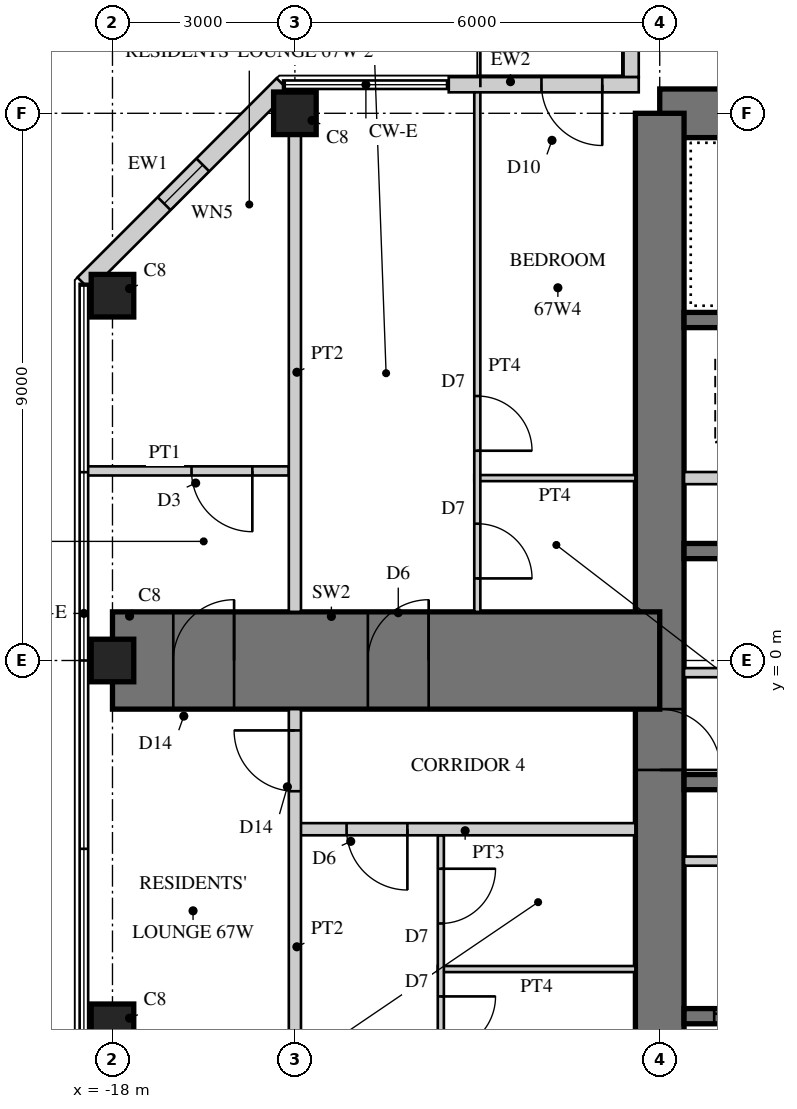
"""IFC4 building model, lengths in metres.
Left out: names, types, materials, properties, quantities, classifications, styles, units other than length and angle.
Written with IfcOpenShell. Run it as: python <this file> out.ifc"""

import sys

from ifc_helpers import new_model, si_unit, direction, frame, frame_2d, origin, origin_2d, place, context, subcontext, project, spatial, rectangle, hollow_rectangle, extrude, element, fill, save


model = new_model("IFC4")
c1 = context("Model", 3, precision=1e-05, world=origin(), true_north=direction((0.0, 1.0)))
c2 = subcontext(c1, "Body", "Model", "MODEL_VIEW")
j1 = project(units=[si_unit("LENGTHUNIT", "METRE"), si_unit("PLANEANGLEUNIT", "RADIAN")], contexts=[c1])
p1 = place(None, origin())
s1 = spatial("IfcSite", under=j1, at=p1, CompositionType="ELEMENT")
p2 = place(p1, origin())
s2 = spatial("IfcBuilding", under=s1, at=p2, CompositionType="ELEMENT")
p3 = place(p2, frame((0.0, 0.0, 261.1)))
s3 = spatial("IfcBuildingStorey", under=s2, at=p3, CompositionType="ELEMENT", Elevation=261.1)
p4 = place(p3, frame((9.0, 9.0, 0.0), z_axis=(0.0, 0.0, 1.0), x_axis=(-1.0, 0.0, 0.0)))
e1 = element("IfcWall", 1, at=p4, inside=s3, PredefinedType="SHEAR", context=c2, shape_type="SweptSolid", body=[
    extrude(rectangle(XDim=18.0, YDim=0.8, at=frame_2d((9.0, 0.0))), origin(), (0.0, 0.0, 1.0), 3.4),
])
p5 = place(p4, frame((9.8, 0.0, 0.0)))
e2 = element("IfcOpeningElement", 2, at=p5, cuts=e1, PredefinedType="OPENING", context=c2, shape_type="SweptSolid", body=[
    extrude(rectangle(XDim=1.0, YDim=2.4, at=frame_2d((0.5, 1.2))), frame((0.0, 0.41, 0.0), z_axis=(0.0, -1.0, 0.0), x_axis=(1.0, 0.0, 0.0)), (0.0, 0.0, 1.0), 0.82),
])
p6 = place(p3, frame((-9.0, 9.0, 0.0), z_axis=(0.0, 0.0, 1.0), x_axis=(0.0, -1.0, 0.0)))
e3 = element("IfcWall", 3, at=p6, inside=s3, PredefinedType="SHEAR", context=c2, shape_type="SweptSolid", body=[
    extrude(rectangle(XDim=18.0, YDim=0.8, at=frame_2d((9.0, 0.0))), origin(), (0.0, 0.0, 1.0), 3.4),
])
p7 = place(p6, frame((9.8, 0.0, 0.0)))
e4 = element("IfcOpeningElement", 4, at=p7, cuts=e3, PredefinedType="OPENING", context=c2, shape_type="SweptSolid", body=[
    extrude(rectangle(XDim=1.0, YDim=2.4, at=frame_2d((0.5, 1.2))), frame((0.0, 0.41, 0.0), z_axis=(0.0, -1.0, 0.0), x_axis=(1.0, 0.0, 0.0)), (0.0, 0.0, 1.0), 0.82),
])
p8 = place(p3, frame((-2.125, 1.8, 0.0), z_axis=(0.0, 0.0, 1.0), x_axis=(-1.0, 0.0, 0.0)))
e5 = element("IfcWall", 5, at=p8, inside=s3, PredefinedType="SHEAR", context=c2, shape_type="SweptSolid", body=[
    extrude(rectangle(XDim=6.475, YDim=0.25, at=frame_2d((3.238, 0.0))), origin(), (0.0, 0.0, 1.0), 3.4),
])
p9 = place(p3, frame((-2.125, 5.6, 0.0), z_axis=(0.0, 0.0, 1.0), x_axis=(-1.0, 0.0, 0.0)))
e6 = element("IfcWall", 6, at=p9, inside=s3, PredefinedType="SHEAR", context=c2, shape_type="SweptSolid", body=[
    extrude(rectangle(XDim=6.475, YDim=0.25, at=frame_2d((3.238, 0.0))), origin(), (0.0, 0.0, 1.0), 3.4),
])
p10 = place(p9, frame((0.175, 0.0, 0.0)))
e7 = element("IfcOpeningElement", 7, at=p10, cuts=e6, PredefinedType="OPENING", context=c2, shape_type="SweptSolid", body=[
    extrude(rectangle(XDim=1.0, YDim=2.1, at=frame_2d((0.5, 1.05))), frame((0.0, 0.135, 0.0), z_axis=(0.0, -1.0, 0.0), x_axis=(1.0, 0.0, 0.0)), (0.0, 0.0, 1.0), 0.27),
])
p11 = place(p3, frame((-5.725, 3.0, 0.0), z_axis=(0.0, 0.0, 1.0), x_axis=(-1.0, 0.0, 0.0)))
e8 = element("IfcWall", 8, at=p11, inside=s3, PredefinedType="PARTITIONING", context=c2, shape_type="SweptSolid", body=[
    extrude(rectangle(XDim=2.875, YDim=0.2, at=frame_2d((1.438, 0.0))), origin(), (0.0, 0.0, 1.0), 3.4),
])
p12 = place(p3, frame((-1.925, -2.0, 0.0), z_axis=(0.0, 0.0, 1.0), x_axis=(-1.0, 0.0, 0.0)))
e9 = element("IfcWall", 9, at=p12, inside=s3, PredefinedType="SHEAR", context=c2, shape_type="SweptSolid", body=[
    extrude(rectangle(XDim=6.675, YDim=0.25, at=frame_2d((3.337, 0.0))), origin(), (0.0, 0.0, 1.0), 3.4),
])
p13 = place(p3, frame((-1.925, -5.85, 0.0), z_axis=(0.0, 0.0, 1.0), x_axis=(-1.0, 0.0, 0.0)))
e10 = element("IfcWall", 10, at=p13, inside=s3, PredefinedType="SHEAR", context=c2, shape_type="SweptSolid", body=[
    extrude(rectangle(XDim=6.675, YDim=0.25, at=frame_2d((3.337, 0.0))), origin(), (0.0, 0.0, 1.0), 3.4),
])
p14 = place(p13, frame((0.496, 0.0, 0.0)))
e11 = element("IfcOpeningElement", 11, at=p14, cuts=e10, PredefinedType="OPENING", context=c2, shape_type="SweptSolid", body=[
    extrude(rectangle(XDim=1.1, YDim=2.2, at=frame_2d((0.55, 1.1))), frame((0.0, 0.135, 0.0), z_axis=(0.0, -1.0, 0.0), x_axis=(1.0, 0.0, 0.0)), (0.0, 0.0, 1.0), 0.27),
])
p15 = place(p13, frame((2.788, 0.0, 0.0)))
e12 = element("IfcOpeningElement", 12, at=p15, cuts=e10, PredefinedType="OPENING", context=c2, shape_type="SweptSolid", body=[
    extrude(rectangle(XDim=1.1, YDim=2.2, at=frame_2d((0.55, 1.1))), frame((0.0, 0.135, 0.0), z_axis=(0.0, -1.0, 0.0), x_axis=(1.0, 0.0, 0.0)), (0.0, 0.0, 1.0), 0.27),
])
p16 = place(p13, frame((5.079, 0.0, 0.0)))
e13 = element("IfcOpeningElement", 13, at=p16, cuts=e10, PredefinedType="OPENING", context=c2, shape_type="SweptSolid", body=[
    extrude(rectangle(XDim=1.1, YDim=2.2, at=frame_2d((0.55, 1.1))), frame((0.0, 0.135, 0.0), z_axis=(0.0, -1.0, 0.0), x_axis=(1.0, 0.0, 0.0)), (0.0, 0.0, 1.0), 0.27),
])
p17 = place(p3, frame((-1.925, -3.3, 0.0), z_axis=(0.0, 0.0, 1.0), x_axis=(-1.0, 0.0, 0.0)))
e14 = element("IfcWall", 14, at=p17, inside=s3, PredefinedType="PARTITIONING", context=c2, shape_type="SweptSolid", body=[
    extrude(rectangle(XDim=6.675, YDim=0.15, at=frame_2d((3.337, 0.0))), origin(), (0.0, 0.0, 1.0), 3.4),
])
p18 = place(p17, frame((0.075, 0.0, 0.0)))
e15 = element("IfcOpeningElement", 15, at=p18, cuts=e14, PredefinedType="OPENING", context=c2, shape_type="SweptSolid", body=[
    extrude(rectangle(XDim=0.8, YDim=2.1, at=frame_2d((0.4, 1.05))), frame((0.0, 0.085, 0.0), z_axis=(0.0, -1.0, 0.0), x_axis=(1.0, 0.0, 0.0)), (0.0, 0.0, 1.0), 0.17),
])
p19 = place(p17, frame((3.675, 0.0, 0.0)))
e16 = element("IfcOpeningElement", 16, at=p19, cuts=e14, PredefinedType="OPENING", context=c2, shape_type="SweptSolid", body=[
    extrude(rectangle(XDim=0.8, YDim=2.1, at=frame_2d((0.4, 1.05))), frame((0.0, 0.085, 0.0), z_axis=(0.0, -1.0, 0.0), x_axis=(1.0, 0.0, 0.0)), (0.0, 0.0, 1.0), 0.17),
])
p20 = place(p3, frame((-9.0, 0.0, 0.0), z_axis=(0.0, 0.0, 1.0), x_axis=(-1.0, 0.0, 0.0)))
e17 = element("IfcWall", 17, at=p20, inside=s3, PredefinedType="SHEAR", context=c2, shape_type="SweptSolid", body=[
    extrude(rectangle(XDim=9.0, YDim=1.6, at=frame_2d((4.5, 0.0))), origin(), (0.0, 0.0, 1.0), 3.4),
])
p21 = place(p20, frame((3.8, 0.0, 0.0)))
e18 = element("IfcOpeningElement", 18, at=p21, cuts=e17, PredefinedType="OPENING", context=c2, shape_type="SweptSolid", body=[
    extrude(rectangle(XDim=1.0, YDim=2.15, at=frame_2d((0.5, 1.075))), frame((0.0, 0.81, 0.0), z_axis=(0.0, -1.0, 0.0), x_axis=(1.0, 0.0, 0.0)), (0.0, 0.0, 1.0), 1.62),
])
p22 = place(p20, frame((7.0, 0.0, 0.0)))
e19 = element("IfcOpeningElement", 19, at=p22, cuts=e17, PredefinedType="OPENING", context=c2, shape_type="SweptSolid", body=[
    extrude(rectangle(XDim=1.0, YDim=2.2, at=frame_2d((0.5, 1.1))), frame((0.0, 0.81, 0.0), z_axis=(0.0, -1.0, 0.0), x_axis=(1.0, 0.0, 0.0)), (0.0, 0.0, 1.0), 1.62),
])
for number, where, z_axis, x_axis in (
    (20, (-15.0, 9.0, 0.0), (0.0, 0.0, 1.0), (1.0, 0.0, 0.0)),
    (21, (-18.0, 6.0, 0.0), (0.0, 0.0, 1.0), (1.0, 0.0, 0.0)),
    (22, (-18.0, 0.0, 0.0), (0.0, 0.0, 1.0), (1.0, 0.0, 0.0)),
    (23, (-18.0, -6.0, 0.0), (0.0, 0.0, 1.0), (1.0, 0.0, 0.0)),
):
    element("IfcColumn", number, at=place(p3, frame(where, z_axis=z_axis, x_axis=x_axis)), inside=s3, PredefinedType="COLUMN", context=c2, shape_type="SweptSolid", body=[
        extrude(rectangle(XDim=0.7, YDim=0.7, at=origin_2d()), origin(), (0.0, 0.0, 1.0), 3.4),
    ])
p23 = place(p3, frame((-9.47, 12.47, 0.0), z_axis=(0.0, 0.0, 1.0), x_axis=(0.0, -1.0, 0.0)))
e24 = element("IfcWall", 24, at=p23, inside=s3, PredefinedType="SOLIDWALL", context=c2, shape_type="SweptSolid", body=[
    extrude(rectangle(XDim=2.875, YDim=0.25, at=frame_2d((1.438, 0.0))), origin(), (0.0, 0.0, 1.0), 3.22),
])
p24 = place(p23, frame((0.6, 0.0, 0.0)))
e25 = element("IfcOpeningElement", 25, at=p24, cuts=e24, PredefinedType="OPENING", context=c2, shape_type="SweptSolid", body=[
    extrude(rectangle(XDim=1.0, YDim=2.2, at=frame_2d((0.5, 1.1))), frame((0.0, 0.135, 0.0), z_axis=(0.0, -1.0, 0.0), x_axis=(1.0, 0.0, 0.0)), (0.0, 0.0, 1.0), 0.27),
])
p25 = place(p3, frame((-9.345, 9.47, 0.0), z_axis=(0.0, 0.0, 1.0), x_axis=(-1.0, 0.0, 0.0)))
e26 = element("IfcWall", 26, at=p25, inside=s3, PredefinedType="SOLIDWALL", context=c2, shape_type="SweptSolid", body=[
    extrude(rectangle(XDim=3.125, YDim=0.25, at=frame_2d((1.562, 0.0))), origin(), (0.0, 0.0, 1.0), 3.22),
])
p26 = place(p25, frame((0.6, 0.0, 0.0)))
e27 = element("IfcOpeningElement", 27, at=p26, cuts=e26, PredefinedType="OPENING", context=c2, shape_type="SweptSolid", body=[
    extrude(rectangle(XDim=1.0, YDim=2.2, at=frame_2d((0.5, 1.1))), frame((0.0, 0.135, 0.0), z_axis=(0.0, -1.0, 0.0), x_axis=(1.0, 0.0, 0.0)), (0.0, 0.0, 1.0), 0.27),
])
p27 = place(p3, frame((-15.195, 9.47, 0.0), z_axis=(0.0, 0.0, 1.0), x_axis=(-0.707106781187, -0.707106781187, 0.0)))
e28 = element("IfcWall", 28, at=p27, inside=s3, PredefinedType="SOLIDWALL", context=c2, shape_type="SweptSolid", body=[
    extrude(rectangle(XDim=4.632, YDim=0.3, at=frame_2d((2.316, 0.0))), origin(), (0.0, 0.0, 1.0), 3.22),
])
p28 = place(p27, frame((1.866, 0.0, 0.3)))
e29 = element("IfcOpeningElement", 29, at=p28, cuts=e28, PredefinedType="OPENING", context=c2, shape_type="SweptSolid", body=[
    extrude(rectangle(XDim=0.9, YDim=2.4, at=frame_2d((0.45, 1.2))), frame((0.0, 0.16, 0.0), z_axis=(0.0, -1.0, 0.0), x_axis=(1.0, 0.0, 0.0)), (0.0, 0.0, 1.0), 0.32),
])
p29 = place(p3, frame((-2.325, -0.2, 0.0), z_axis=(0.0, 0.0, 1.0), x_axis=(-1.0, 0.0, 0.0)))
e30 = element("IfcWall", 30, at=p29, inside=s3, PredefinedType="PARTITIONING", context=c2, shape_type="SweptSolid", body=[
    extrude(rectangle(XDim=6.275, YDim=0.15, at=frame_2d((3.138, 0.0))), origin(), (0.0, 0.0, 1.0), 3.22),
])
p30 = place(p29, frame((0.4, 0.0, 0.0)))
e31 = element("IfcOpeningElement", 31, at=p30, cuts=e30, PredefinedType="OPENING", context=c2, shape_type="SweptSolid", body=[
    extrude(rectangle(XDim=1.0, YDim=2.1, at=frame_2d((0.5, 1.05))), frame((0.0, 0.085, 0.0), z_axis=(0.0, -1.0, 0.0), x_axis=(1.0, 0.0, 0.0)), (0.0, 0.0, 1.0), 0.17),
])
p31 = place(p3, frame((-9.4, -5.075, 0.0), z_axis=(0.0, 0.0, 1.0), x_axis=(-1.0, 0.0, 0.0)))
e32 = element("IfcWall", 32, at=p31, inside=s3, PredefinedType="PARTITIONING", context=c2, shape_type="SweptSolid", body=[
    extrude(rectangle(XDim=3.25, YDim=0.1, at=frame_2d((1.625, 0.0))), origin(), (0.0, 0.0, 1.0), 3.22),
])
p32 = place(p3, frame((-12.6, -2.875, 0.0), z_axis=(0.0, 0.0, 1.0), x_axis=(0.0, -1.0, 0.0)))
e33 = element("IfcWall", 33, at=p32, inside=s3, PredefinedType="PARTITIONING", context=c2, shape_type="SweptSolid", body=[
    extrude(rectangle(XDim=6.555, YDim=0.1, at=frame_2d((3.277, 0.0))), origin(), (0.0, 0.0, 1.0), 3.22),
])
p33 = place(p32, frame((0.55, 0.0, 0.0)))
e34 = element("IfcOpeningElement", 34, at=p33, cuts=e33, PredefinedType="OPENING", context=c2, shape_type="SweptSolid", body=[
    extrude(rectangle(XDim=0.9, YDim=2.1, at=frame_2d((0.45, 1.05))), frame((0.0, 0.06, 0.0), z_axis=(0.0, -1.0, 0.0), x_axis=(1.0, 0.0, 0.0)), (0.0, 0.0, 1.0), 0.12),
])
p34 = place(p32, frame((2.65, 0.0, 0.0)))
e35 = element("IfcOpeningElement", 35, at=p34, cuts=e33, PredefinedType="OPENING", context=c2, shape_type="SweptSolid", body=[
    extrude(rectangle(XDim=0.9, YDim=2.1, at=frame_2d((0.45, 1.05))), frame((0.0, 0.06, 0.0), z_axis=(0.0, -1.0, 0.0), x_axis=(1.0, 0.0, 0.0)), (0.0, 0.0, 1.0), 0.12),
])
p35 = place(p3, frame((-9.4, 3.0, 0.0), z_axis=(0.0, 0.0, 1.0), x_axis=(-1.0, 0.0, 0.0)))
e36 = element("IfcWall", 36, at=p35, inside=s3, PredefinedType="PARTITIONING", context=c2, shape_type="SweptSolid", body=[
    extrude(rectangle(XDim=2.65, YDim=0.1, at=frame_2d((1.325, 0.0))), origin(), (0.0, 0.0, 1.0), 3.22),
])
p36 = place(p3, frame((-12.0, 9.345, 0.0), z_axis=(0.0, 0.0, 1.0), x_axis=(0.0, -1.0, 0.0)))
e37 = element("IfcWall", 37, at=p36, inside=s3, PredefinedType="PARTITIONING", context=c2, shape_type="SweptSolid", body=[
    extrude(rectangle(XDim=8.545, YDim=0.1, at=frame_2d((4.272, 0.0))), origin(), (0.0, 0.0, 1.0), 3.22),
])
p37 = place(p36, frame((4.995, 0.0, 0.0)))
e38 = element("IfcOpeningElement", 38, at=p37, cuts=e37, PredefinedType="OPENING", context=c2, shape_type="SweptSolid", body=[
    extrude(rectangle(XDim=0.9, YDim=2.1, at=frame_2d((0.45, 1.05))), frame((0.0, 0.06, 0.0), z_axis=(0.0, -1.0, 0.0), x_axis=(1.0, 0.0, 0.0)), (0.0, 0.0, 1.0), 0.12),
])
p38 = place(p36, frame((7.095, 0.0, 0.0)))
e39 = element("IfcOpeningElement", 39, at=p38, cuts=e37, PredefinedType="OPENING", context=c2, shape_type="SweptSolid", body=[
    extrude(rectangle(XDim=0.9, YDim=2.1, at=frame_2d((0.45, 1.05))), frame((0.0, 0.06, 0.0), z_axis=(0.0, -1.0, 0.0), x_axis=(1.0, 0.0, 0.0)), (0.0, 0.0, 1.0), 0.12),
])
p39 = place(p3, frame((-9.4, -2.775, 0.0), z_axis=(0.0, 0.0, 1.0), x_axis=(-1.0, 0.0, 0.0)))
e40 = element("IfcWall", 40, at=p39, inside=s3, PredefinedType="SOLIDWALL", context=c2, shape_type="SweptSolid", body=[
    extrude(rectangle(XDim=5.6, YDim=0.2, at=frame_2d((2.8, 0.0))), origin(), (0.0, 0.0, 1.0), 3.22),
])
p40 = place(p39, frame((3.75, 0.0, 0.0)))
e41 = element("IfcOpeningElement", 41, at=p40, cuts=e40, PredefinedType="OPENING", context=c2, shape_type="SweptSolid", body=[
    extrude(rectangle(XDim=1.0, YDim=2.15, at=frame_2d((0.5, 1.075))), frame((0.0, 0.11, 0.0), z_axis=(0.0, -1.0, 0.0), x_axis=(1.0, 0.0, 0.0)), (0.0, 0.0, 1.0), 0.22),
])
p41 = place(p3, frame((-15.1, 3.118, 0.0), z_axis=(0.0, 0.0, 1.0), x_axis=(-1.0, 0.0, 0.0)))
e42 = element("IfcWall", 42, at=p41, inside=s3, PredefinedType="PARTITIONING", context=c2, shape_type="SweptSolid", body=[
    extrude(rectangle(XDim=3.33, YDim=0.15, at=frame_2d((1.665, 0.0))), origin(), (0.0, 0.0, 1.0), 3.22),
])
p42 = place(p41, frame((0.6, 0.0, 0.0)))
e43 = element("IfcOpeningElement", 43, at=p42, cuts=e42, PredefinedType="OPENING", context=c2, shape_type="SweptSolid", body=[
    extrude(rectangle(XDim=1.0, YDim=2.1, at=frame_2d((0.5, 1.05))), frame((0.0, 0.085, 0.0), z_axis=(0.0, -1.0, 0.0), x_axis=(1.0, 0.0, 0.0)), (0.0, 0.0, 1.0), 0.17),
])
p43 = place(p3, frame((-15.0, 8.65, 0.0), z_axis=(0.0, 0.0, 1.0), x_axis=(0.0, -1.0, 0.0)))
e44 = element("IfcWall", 44, at=p43, inside=s3, PredefinedType="SOLIDWALL", context=c2, shape_type="SweptSolid", body=[
    extrude(rectangle(XDim=7.85, YDim=0.2, at=frame_2d((3.925, 0.0))), origin(), (0.0, 0.0, 1.0), 2.52),
])
p44 = place(p3, frame((-15.0, -0.8, 0.0), z_axis=(0.0, 0.0, 1.0), x_axis=(0.0, -1.0, 0.0)))
e45 = element("IfcWall", 45, at=p44, inside=s3, PredefinedType="SOLIDWALL", context=c2, shape_type="SweptSolid", body=[
    extrude(rectangle(XDim=7.85, YDim=0.2, at=frame_2d((3.925, 0.0))), origin(), (0.0, 0.0, 1.0), 2.52),
])
p45 = place(p44, frame((0.35, 0.0, 0.0)))
e46 = element("IfcOpeningElement", 46, at=p45, cuts=e45, PredefinedType="OPENING", context=c2, shape_type="SweptSolid", body=[
    extrude(rectangle(XDim=1.0, YDim=2.2, at=frame_2d((0.5, 1.1))), frame((0.0, 0.11, 0.0), z_axis=(0.0, -1.0, 0.0), x_axis=(1.0, 0.0, 0.0)), (0.0, 0.0, 1.0), 0.22),
])
p46 = place(p26, origin())
e47 = element("IfcDoor", 47, at=p46, inside=s3, OperationType="SINGLE_SWING_LEFT", PredefinedType="DOOR", context=c2, shape_type="SweptSolid", body=[
    extrude(hollow_rectangle(XDim=1.0, YDim=2.2, WallThickness=0.06, at=frame_2d((0.5, 1.1))), frame((0.0, 0.025, 0.0), z_axis=(0.0, -1.0, 0.0), x_axis=(1.0, 0.0, 0.0)), (0.0, 0.0, 1.0), 0.05),
    extrude(rectangle(XDim=0.879, YDim=2.079, at=frame_2d((0.5, 1.1))), frame((0.0, 0.025, 0.0), z_axis=(0.0, -1.0, 0.0), x_axis=(1.0, 0.0, 0.0)), (0.0, 0.0, 1.0), 0.05),
])
fill(e27, e47)
p47 = place(p28, origin())
e48 = element("IfcWindow", 48, at=p47, inside=s3, PartitioningType="SINGLE_PANEL", PredefinedType="WINDOW", context=c2, shape_type="SweptSolid", body=[
    extrude(hollow_rectangle(XDim=0.9, YDim=2.4, WallThickness=0.06, at=frame_2d((0.45, 1.2))), frame((0.0, 0.03, 0.0), z_axis=(0.0, -1.0, 0.0), x_axis=(1.0, 0.0, 0.0)), (0.0, 0.0, 1.0), 0.06),
    extrude(rectangle(XDim=0.779, YDim=2.279, at=frame_2d((0.45, 1.2))), frame((0.0, 0.03, 0.0), z_axis=(0.0, -1.0, 0.0), x_axis=(1.0, 0.0, 0.0)), (0.0, 0.0, 1.0), 0.06),
])
fill(e29, e48)
p48 = place(p33, origin())
e49 = element("IfcDoor", 49, at=p48, inside=s3, OperationType="SINGLE_SWING_LEFT", PredefinedType="DOOR", context=c2, shape_type="SweptSolid", body=[
    extrude(rectangle(XDim=0.9, YDim=2.1, at=frame_2d((0.45, 1.05))), frame((0.0, 0.025, 0.0), z_axis=(0.0, -1.0, 0.0), x_axis=(1.0, 0.0, 0.0)), (0.0, 0.0, 1.0), 0.05),
])
fill(e34, e49)
p49 = place(p34, origin())
e50 = element("IfcDoor", 50, at=p49, inside=s3, OperationType="SINGLE_SWING_LEFT", PredefinedType="DOOR", context=c2, shape_type="SweptSolid", body=[
    extrude(rectangle(XDim=0.9, YDim=2.1, at=frame_2d((0.45, 1.05))), frame((0.0, 0.025, 0.0), z_axis=(0.0, -1.0, 0.0), x_axis=(1.0, 0.0, 0.0)), (0.0, 0.0, 1.0), 0.05),
])
fill(e35, e50)
p50 = place(p37, origin())
e51 = element("IfcDoor", 51, at=p50, inside=s3, OperationType="SINGLE_SWING_RIGHT", PredefinedType="DOOR", context=c2, shape_type="SweptSolid", body=[
    extrude(rectangle(XDim=0.9, YDim=2.1, at=frame_2d((0.45, 1.05))), frame((0.0, 0.025, 0.0), z_axis=(0.0, -1.0, 0.0), x_axis=(1.0, 0.0, 0.0)), (0.0, 0.0, 1.0), 0.05),
])
fill(e38, e51)
p51 = place(p38, origin())
e52 = element("IfcDoor", 52, at=p51, inside=s3, OperationType="SINGLE_SWING_RIGHT", PredefinedType="DOOR", context=c2, shape_type="SweptSolid", body=[
    extrude(rectangle(XDim=0.9, YDim=2.1, at=frame_2d((0.45, 1.05))), frame((0.0, 0.025, 0.0), z_axis=(0.0, -1.0, 0.0), x_axis=(1.0, 0.0, 0.0)), (0.0, 0.0, 1.0), 0.05),
])
fill(e39, e52)
p52 = place(p40, origin())
e53 = element("IfcDoor", 53, at=p52, inside=s3, OperationType="SINGLE_SWING_LEFT", PredefinedType="DOOR", context=c2, shape_type="SweptSolid", body=[
    extrude(rectangle(XDim=1.0, YDim=2.15, at=frame_2d((0.5, 1.075))), frame((0.0, 0.025, 0.0), z_axis=(0.0, -1.0, 0.0), x_axis=(1.0, 0.0, 0.0)), (0.0, 0.0, 1.0), 0.05),
])
fill(e41, e53)
p53 = place(p42, origin())
e54 = element("IfcDoor", 54, at=p53, inside=s3, OperationType="SINGLE_SWING_LEFT", PredefinedType="DOOR", context=c2, shape_type="SweptSolid", body=[
    extrude(rectangle(XDim=1.0, YDim=2.1, at=frame_2d((0.5, 1.05))), frame((0.0, 0.025, 0.0), z_axis=(0.0, -1.0, 0.0), x_axis=(1.0, 0.0, 0.0)), (0.0, 0.0, 1.0), 0.05),
])
fill(e43, e54)
p54 = place(p45, frame((1.0, 0.0, 0.0), z_axis=(0.0, 0.0, 1.0), x_axis=(-1.0, 0.0, 0.0)))
e55 = element("IfcDoor", 55, at=p54, inside=s3, OperationType="SINGLE_SWING_RIGHT", PredefinedType="DOOR", context=c2, shape_type="SweptSolid", body=[
    extrude(rectangle(XDim=1.0, YDim=2.2, at=frame_2d((0.5, 1.1))), frame((0.0, 0.025, 0.0), z_axis=(0.0, -1.0, 0.0), x_axis=(1.0, 0.0, 0.0)), (0.0, 0.0, 1.0), 0.05),
])
fill(e46, e55)
p55 = place(p21, frame((1.0, 0.0, 0.0), z_axis=(0.0, 0.0, 1.0), x_axis=(-1.0, 0.0, 0.0)))
e56 = element("IfcDoor", 56, at=p55, inside=s3, OperationType="SINGLE_SWING_RIGHT", PredefinedType="DOOR", context=c2, shape_type="SweptSolid", body=[
    extrude(rectangle(XDim=1.0, YDim=2.15, at=frame_2d((0.5, 1.075))), frame((0.0, 0.025, 0.0), z_axis=(0.0, -1.0, 0.0), x_axis=(1.0, 0.0, 0.0)), (0.0, 0.0, 1.0), 0.05),
])
fill(e18, e56)
p56 = place(p22, frame((1.0, 0.0, 0.0), z_axis=(0.0, 0.0, 1.0), x_axis=(-1.0, 0.0, 0.0)))
e57 = element("IfcDoor", 57, at=p56, inside=s3, OperationType="SINGLE_SWING_RIGHT", PredefinedType="DOOR", context=c2, shape_type="SweptSolid", body=[
    extrude(rectangle(XDim=1.0, YDim=2.2, at=frame_2d((0.5, 1.1))), frame((0.0, 0.025, 0.0), z_axis=(0.0, -1.0, 0.0), x_axis=(1.0, 0.0, 0.0)), (0.0, 0.0, 1.0), 0.05),
])
fill(e19, e57)
p57 = place(p7, origin())
e58 = element("IfcDoor", 58, at=p57, inside=s3, OperationType="SINGLE_SWING_RIGHT", PredefinedType="DOOR", context=c2, shape_type="SweptSolid", body=[
    extrude(rectangle(XDim=1.0, YDim=2.4, at=frame_2d((0.5, 1.2))), frame((0.0, 0.055, 0.0), z_axis=(0.0, -1.0, 0.0), x_axis=(1.0, 0.0, 0.0)), (0.0, 0.0, 1.0), 0.05),
])
fill(e4, e58)
p58 = place(p16, origin())
e59 = element("IfcDoor", 59, at=p58, inside=s3, OperationType="DOUBLE_DOOR_SLIDING", PredefinedType="DOOR", context=c2, shape_type="SweptSolid", body=[
    extrude(rectangle(XDim=1.1, YDim=2.2, at=frame_2d((0.55, 1.1))), frame((0.0, 0.025, 0.0), z_axis=(0.0, -1.0, 0.0), x_axis=(1.0, 0.0, 0.0)), (0.0, 0.0, 1.0), 0.05),
])
fill(e13, e59)
save(model, sys.argv[1])
